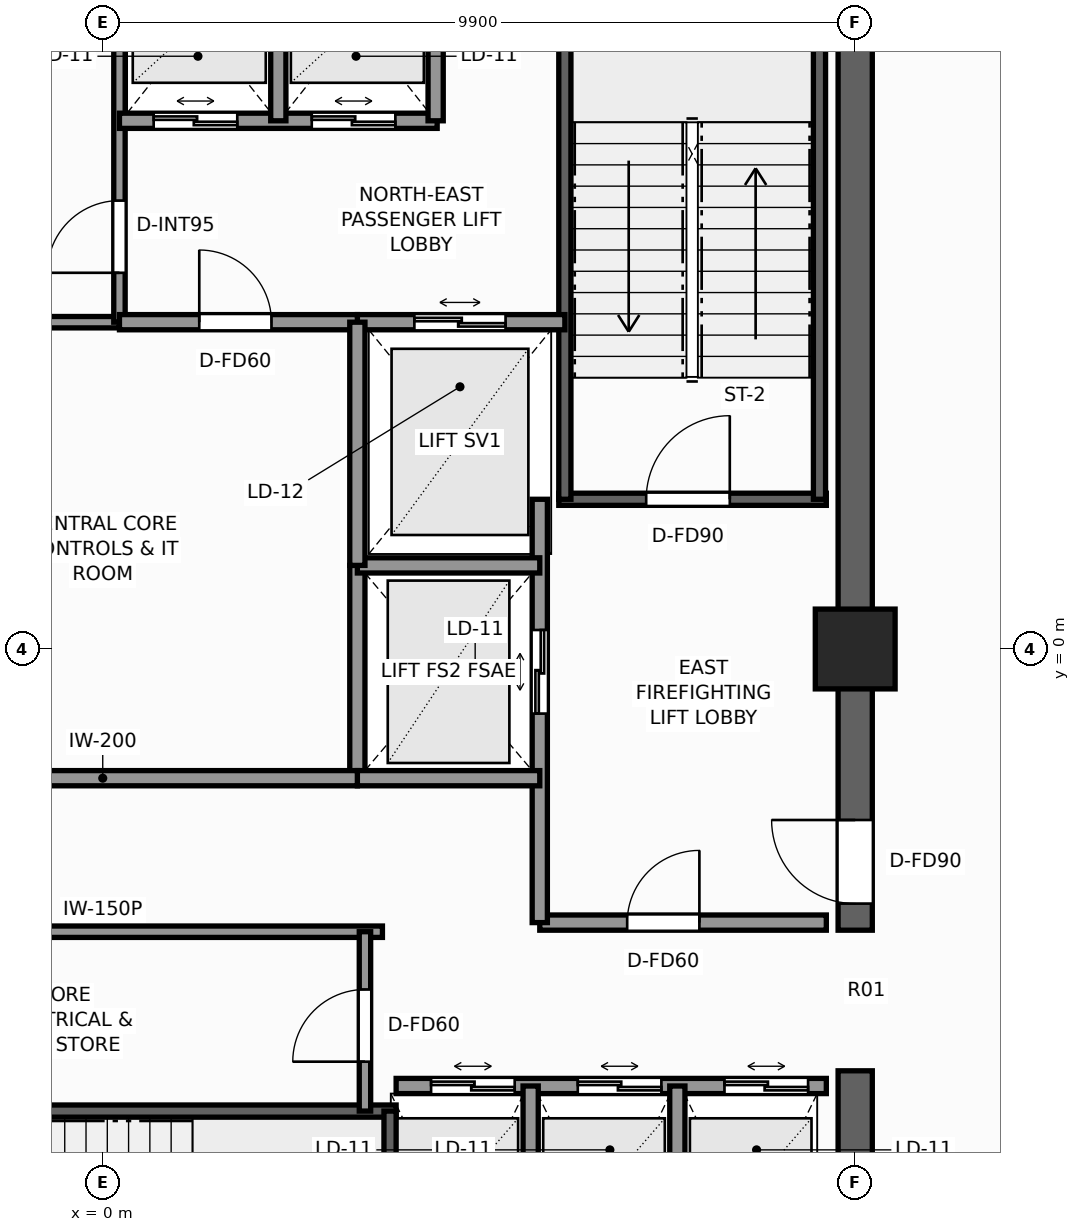
"""IFC4 building model, lengths in metres.
Left out: names, types, materials, properties, quantities, classifications, styles, units other than length and angle.
Written with IfcOpenShell. Run it as: python <this file> out.ifc"""

import sys

from ifc_helpers import new_model, si_unit, direction, frame, frame_2d, origin, origin_2d, place, context, subcontext, project, spatial, rectangle, extrude, element, fill, save


model = new_model("IFC4")
c1 = context("Model", 3, precision=1e-05, world=origin(), true_north=direction((0.0, 1.0)))
c2 = subcontext(c1, "Body", "Model", "MODEL_VIEW")
j1 = project(units=[si_unit("LENGTHUNIT", "METRE"), si_unit("PLANEANGLEUNIT", "RADIAN")], contexts=[c1])
p1 = place(None, origin())
s1 = spatial("IfcSite", under=j1, at=p1, CompositionType="ELEMENT")
p2 = place(p1, origin())
s2 = spatial("IfcBuilding", under=s1, at=p2, CompositionType="ELEMENT")
p3 = place(p2, frame((0.0, 0.0, 262.8)))
s3 = spatial("IfcBuildingStorey", under=s2, at=p3, CompositionType="ELEMENT", Elevation=262.8)
p4 = place(p3, frame((9.9, -9.675, 0.0), z_axis=(0.0, 0.0, 1.0), x_axis=(0.0, 1.0, 0.0)))
e1 = element("IfcWall", 1, at=p4, inside=s3, PredefinedType="SHEAR", context=c2, shape_type="SweptSolid", body=[
    extrude(rectangle(XDim=4.125, YDim=0.45, at=frame_2d((2.062, 0.0))), origin(), (0.0, 0.0, 1.0), 4.6),
])
p5 = place(p3, frame((9.9, -3.7, 0.0), z_axis=(0.0, 0.0, 1.0), x_axis=(0.0, 1.0, 0.0)))
e2 = element("IfcWall", 2, at=p5, inside=s3, PredefinedType="SHEAR", context=c2, shape_type="SweptSolid", body=[
    extrude(rectangle(XDim=13.375, YDim=0.45, at=frame_2d((6.688, 0.0))), origin(), (0.0, 0.0, 1.0), 4.6),
])
p6 = place(p5, frame((0.35, 0.0, 0.0)))
e3 = element("IfcOpeningElement", 3, at=p6, cuts=e2, PredefinedType="OPENING", context=c2, shape_type="SweptSolid", body=[
    extrude(rectangle(XDim=1.1, YDim=2.2, at=frame_2d((0.55, 1.1))), frame((0.0, 0.235, 0.0), z_axis=(0.0, -1.0, 0.0), x_axis=(1.0, 0.0, 0.0)), (0.0, 0.0, 1.0), 0.47),
])
p7 = place(p3, frame((9.9, 0.0, 0.0), z_axis=(0.0, 0.0, 1.0), x_axis=(1.0, 0.0, 0.0)))
e4 = element("IfcColumn", 4, at=p7, inside=s3, PredefinedType="COLUMN", context=c2, shape_type="SweptSolid", body=[
    extrude(rectangle(XDim=1.05, YDim=1.05, at=origin_2d()), origin(), (0.0, 0.0, 1.0), 4.6),
])
p8 = place(p3, frame((6.0, 1.97, 0.0), z_axis=(0.0, 0.0, 1.0), x_axis=(1.0, 0.0, 0.0)))
e5 = element("IfcWall", 5, at=p8, inside=s3, PredefinedType="SHEAR", context=c2, shape_type="SweptSolid", body=[
    extrude(rectangle(XDim=3.52, YDim=0.16, at=frame_2d((1.76, 0.0))), origin(), (0.0, 0.0, 1.0), 4.6),
])
p9 = place(p8, frame((1.15, 0.0, 0.0)))
e6 = element("IfcOpeningElement", 6, at=p9, cuts=e5, PredefinedType="OPENING", context=c2, shape_type="SweptSolid", body=[
    extrude(rectangle(XDim=1.1, YDim=2.2, at=frame_2d((0.55, 1.1))), frame((0.0, 0.09, 0.0), z_axis=(0.0, -1.0, 0.0), x_axis=(1.0, 0.0, 0.0)), (0.0, 0.0, 1.0), 0.18),
])
for number, where, z_axis, x_axis in (
    (7, (6.08, 1.97, 0.0), (0.0, 0.0, 1.0), (0.0, 1.0, 0.0)),
    (8, (9.43, 1.97, 0.0), (0.0, 0.0, 1.0), (0.0, 1.0, 0.0)),
):
    element("IfcWall", number, at=place(p3, frame(where, z_axis=z_axis, x_axis=x_axis)), inside=s3, PredefinedType="SHEAR", context=c2, shape_type="SweptSolid", body=[
        extrude(rectangle(XDim=7.56, YDim=0.16, at=frame_2d((3.78, 0.0))), origin(), (0.0, 0.0, 1.0), 4.6),
    ])
p10 = place(p3, frame((-3.86, -6.08, 0.0), z_axis=(0.0, 0.0, 1.0), x_axis=(1.0, 0.0, 0.0)))
e9 = element("IfcWall", 9, at=p10, inside=s3, PredefinedType="SHEAR", context=c2, shape_type="SweptSolid", body=[
    extrude(rectangle(XDim=7.72, YDim=0.16, at=frame_2d((3.86, 0.0))), origin(), (0.0, 0.0, 1.0), 4.6),
])
p11 = place(p3, frame((3.78, -9.43, 0.0), z_axis=(0.0, 0.0, 1.0), x_axis=(0.0, 1.0, 0.0)))
e10 = element("IfcWall", 10, at=p11, inside=s3, PredefinedType="SHEAR", context=c2, shape_type="SweptSolid", body=[
    extrude(rectangle(XDim=3.35, YDim=0.16, at=frame_2d((1.675, 0.0))), origin(), (0.0, 0.0, 1.0), 4.6),
])
p12 = place(p3, frame((5.75, -3.6, 0.0), z_axis=(0.0, 0.0, 1.0), x_axis=(1.0, 0.0, 0.0)))
e11 = element("IfcWall", 11, at=p12, inside=s3, PredefinedType="SOLIDWALL", context=c2, shape_type="SweptSolid", body=[
    extrude(rectangle(XDim=3.77, YDim=0.2, at=frame_2d((1.885, 0.0))), origin(), (0.0, 0.0, 1.0), 4.32),
])
p13 = place(p12, frame((1.15, 0.0, 0.0)))
e12 = element("IfcOpeningElement", 12, at=p13, cuts=e11, PredefinedType="OPENING", context=c2, shape_type="SweptSolid", body=[
    extrude(rectangle(XDim=0.95, YDim=2.06, at=frame_2d((0.475, 1.03))), frame((0.0, 0.11, 0.0), z_axis=(0.0, -1.0, 0.0), x_axis=(1.0, 0.0, 0.0)), (0.0, 0.0, 1.0), 0.22),
])
p14 = place(p3, frame((5.75, -3.6, 0.0), z_axis=(0.0, 0.0, 1.0), x_axis=(0.0, 1.0, 0.0)))
e13 = element("IfcWall", 13, at=p14, inside=s3, PredefinedType="SOLIDWALL", context=c2, shape_type="SweptSolid", body=[
    extrude(rectangle(XDim=5.57, YDim=0.2, at=frame_2d((2.785, 0.0))), origin(), (0.0, 0.0, 1.0), 4.32),
])
p15 = place(p14, frame((2.75, 0.0, 0.0)))
e14 = element("IfcOpeningElement", 14, at=p15, cuts=e13, PredefinedType="OPENING", context=c2, shape_type="SweptSolid", body=[
    extrude(rectangle(XDim=1.1, YDim=2.2, at=frame_2d((0.55, 1.1))), frame((0.0, 0.11, 0.0), z_axis=(0.0, -1.0, 0.0), x_axis=(1.0, 0.0, 0.0)), (0.0, 0.0, 1.0), 0.22),
])
p16 = place(p3, frame((3.35, -1.7, 0.0), z_axis=(0.0, 0.0, 1.0), x_axis=(0.0, 1.0, 0.0)))
e15 = element("IfcWall", 15, at=p16, inside=s3, PredefinedType="SOLIDWALL", context=c2, shape_type="SweptSolid", body=[
    extrude(rectangle(XDim=2.8, YDim=0.2, at=frame_2d((1.4, 0.0))), origin(), (0.0, 0.0, 1.0), 4.32),
])
for number, where, z_axis, x_axis in (
    (16, (3.35, -1.7, 0.0), (0.0, 0.0, 1.0), (1.0, 0.0, 0.0)),
    (17, (3.35, 1.1, 0.0), (0.0, 0.0, 1.0), (1.0, 0.0, 0.0)),
):
    element("IfcWall", number, at=place(p3, frame(where, z_axis=z_axis, x_axis=x_axis)), inside=s3, PredefinedType="SOLIDWALL", context=c2, shape_type="SweptSolid", body=[
        extrude(rectangle(XDim=2.4, YDim=0.2, at=frame_2d((1.2, 0.0))), origin(), (0.0, 0.0, 1.0), 4.32),
    ])
p17 = place(p3, frame((3.35, 4.3, 0.0), z_axis=(0.0, 0.0, 1.0), x_axis=(1.0, 0.0, 0.0)))
e18 = element("IfcWall", 18, at=p17, inside=s3, PredefinedType="SOLIDWALL", context=c2, shape_type="SweptSolid", body=[
    extrude(rectangle(XDim=2.73, YDim=0.2, at=frame_2d((1.365, 0.0))), origin(), (0.0, 0.0, 1.0), 4.32),
])
p18 = place(p17, frame((0.75, 0.0, 0.0)))
e19 = element("IfcOpeningElement", 19, at=p18, cuts=e18, PredefinedType="OPENING", context=c2, shape_type="SweptSolid", body=[
    extrude(rectangle(XDim=1.2, YDim=2.25, at=frame_2d((0.6, 1.125))), frame((0.0, 0.11, 0.0), z_axis=(0.0, -1.0, 0.0), x_axis=(1.0, 0.0, 0.0)), (0.0, 0.0, 1.0), 0.22),
])
p19 = place(p3, frame((-6.08, 4.3, 0.0), z_axis=(0.0, 0.0, 1.0), x_axis=(1.0, 0.0, 0.0)))
e20 = element("IfcWall", 20, at=p19, inside=s3, PredefinedType="PARTITIONING", context=c2, shape_type="SweptSolid", body=[
    extrude(rectangle(XDim=6.3, YDim=0.15, at=frame_2d((3.15, 0.0))), origin(), (0.0, 0.0, 1.0), 4.32),
])
p20 = place(p19, frame((1.05, 0.0, 0.0)))
e21 = element("IfcOpeningElement", 21, at=p20, cuts=e20, PredefinedType="OPENING", context=c2, shape_type="SweptSolid", body=[
    extrude(rectangle(XDim=0.85, YDim=2.03, at=frame_2d((0.425, 1.015))), frame((0.0, 0.085, 0.0), z_axis=(0.0, -1.0, 0.0), x_axis=(1.0, 0.0, 0.0)), (0.0, 0.0, 1.0), 0.17),
])
p21 = place(p3, frame((0.22, 4.3, 0.0), z_axis=(0.0, 0.0, 1.0), x_axis=(0.0, 1.0, 0.0)))
e22 = element("IfcWall", 22, at=p21, inside=s3, PredefinedType="PARTITIONING", context=c2, shape_type="SweptSolid", body=[
    extrude(rectangle(XDim=5.22, YDim=0.15, at=frame_2d((2.61, 0.0))), origin(), (0.0, 0.0, 1.0), 4.32),
])
p22 = place(p21, frame((0.65, 0.0, 0.0)))
e23 = element("IfcOpeningElement", 23, at=p22, cuts=e22, PredefinedType="OPENING", context=c2, shape_type="SweptSolid", body=[
    extrude(rectangle(XDim=0.95, YDim=2.06, at=frame_2d((0.475, 1.03))), frame((0.0, 0.085, 0.0), z_axis=(0.0, -1.0, 0.0), x_axis=(1.0, 0.0, 0.0)), (0.0, 0.0, 1.0), 0.17),
])
p23 = place(p3, frame((0.22, 6.95, 0.0), z_axis=(0.0, 0.0, 1.0), x_axis=(1.0, 0.0, 0.0)))
e24 = element("IfcWall", 24, at=p23, inside=s3, PredefinedType="SOLIDWALL", context=c2, shape_type="SweptSolid", body=[
    extrude(rectangle(XDim=4.18, YDim=0.2, at=frame_2d((2.09, 0.0))), origin(), (0.0, 0.0, 1.0), 4.32),
])
p24 = place(p23, frame((0.45, 0.0, 0.0)))
e25 = element("IfcOpeningElement", 25, at=p24, cuts=e24, PredefinedType="OPENING", context=c2, shape_type="SweptSolid", body=[
    extrude(rectangle(XDim=1.1, YDim=2.2, at=frame_2d((0.55, 1.1))), frame((0.0, 0.11, 0.0), z_axis=(0.0, -1.0, 0.0), x_axis=(1.0, 0.0, 0.0)), (0.0, 0.0, 1.0), 0.22),
])
p25 = place(p23, frame((2.53, 0.0, 0.0)))
e26 = element("IfcOpeningElement", 26, at=p25, cuts=e24, PredefinedType="OPENING", context=c2, shape_type="SweptSolid", body=[
    extrude(rectangle(XDim=1.1, YDim=2.2, at=frame_2d((0.55, 1.1))), frame((0.0, 0.11, 0.0), z_axis=(0.0, -1.0, 0.0), x_axis=(1.0, 0.0, 0.0)), (0.0, 0.0, 1.0), 0.22),
])
for number, where, z_axis, x_axis in (
    (27, (4.38, 6.95, 0.0), (0.0, 0.0, 1.0), (0.0, 1.0, 0.0)),
    (28, (2.31, 6.95, 0.0), (0.0, 0.0, 1.0), (0.0, 1.0, 0.0)),
):
    element("IfcWall", number, at=place(p3, frame(where, z_axis=z_axis, x_axis=x_axis)), inside=s3, PredefinedType="SOLIDWALL", context=c2, shape_type="SweptSolid", body=[
        extrude(rectangle(XDim=2.57, YDim=0.2, at=frame_2d((1.285, 0.0))), origin(), (0.0, 0.0, 1.0), 4.32),
    ])
p26 = place(p3, frame((3.86, -5.75, 0.0), z_axis=(0.0, 0.0, 1.0), x_axis=(1.0, 0.0, 0.0)))
e29 = element("IfcWall", 29, at=p26, inside=s3, PredefinedType="SOLIDWALL", context=c2, shape_type="SweptSolid", body=[
    extrude(rectangle(XDim=5.66, YDim=0.2, at=frame_2d((2.83, 0.0))), origin(), (0.0, 0.0, 1.0), 4.32),
])
p27 = place(p26, frame((0.46, 0.0, 0.0)))
e30 = element("IfcOpeningElement", 30, at=p27, cuts=e29, PredefinedType="OPENING", context=c2, shape_type="SweptSolid", body=[
    extrude(rectangle(XDim=1.1, YDim=2.2, at=frame_2d((0.55, 1.1))), frame((0.0, 0.11, 0.0), z_axis=(0.0, -1.0, 0.0), x_axis=(1.0, 0.0, 0.0)), (0.0, 0.0, 1.0), 0.22),
])
p28 = place(p26, frame((2.39, 0.0, 0.0)))
e31 = element("IfcOpeningElement", 31, at=p28, cuts=e29, PredefinedType="OPENING", context=c2, shape_type="SweptSolid", body=[
    extrude(rectangle(XDim=1.1, YDim=2.2, at=frame_2d((0.55, 1.1))), frame((0.0, 0.11, 0.0), z_axis=(0.0, -1.0, 0.0), x_axis=(1.0, 0.0, 0.0)), (0.0, 0.0, 1.0), 0.22),
])
p29 = place(p26, frame((4.32, 0.0, 0.0)))
e32 = element("IfcOpeningElement", 32, at=p29, cuts=e29, PredefinedType="OPENING", context=c2, shape_type="SweptSolid", body=[
    extrude(rectangle(XDim=1.1, YDim=2.2, at=frame_2d((0.55, 1.1))), frame((0.0, 0.11, 0.0), z_axis=(0.0, -1.0, 0.0), x_axis=(1.0, 0.0, 0.0)), (0.0, 0.0, 1.0), 0.22),
])
for number, where, z_axis, x_axis in (
    (33, (5.63, -9.52, 0.0), (0.0, 0.0, 1.0), (0.0, 1.0, 0.0)),
    (34, (7.56, -9.52, 0.0), (0.0, 0.0, 1.0), (0.0, 1.0, 0.0)),
):
    element("IfcWall", number, at=place(p3, frame(where, z_axis=z_axis, x_axis=x_axis)), inside=s3, PredefinedType="SOLIDWALL", context=c2, shape_type="SweptSolid", body=[
        extrude(rectangle(XDim=3.77, YDim=0.2, at=frame_2d((1.885, 0.0))), origin(), (0.0, 0.0, 1.0), 4.32),
    ])
p30 = place(p3, frame((0.22, 4.3, 0.0), z_axis=(0.0, 0.0, 1.0), x_axis=(1.0, 0.0, 0.0)))
e35 = element("IfcWall", 35, at=p30, inside=s3, PredefinedType="SOLIDWALL", context=c2, shape_type="SweptSolid", body=[
    extrude(rectangle(XDim=3.13, YDim=0.2, at=frame_2d((1.565, 0.0))), origin(), (0.0, 0.0, 1.0), 4.32),
])
p31 = place(p30, frame((1.05, 0.0, 0.0)))
e36 = element("IfcOpeningElement", 36, at=p31, cuts=e35, PredefinedType="OPENING", context=c2, shape_type="SweptSolid", body=[
    extrude(rectangle(XDim=0.95, YDim=2.06, at=frame_2d((0.475, 1.03))), frame((0.0, 0.11, 0.0), z_axis=(0.0, -1.0, 0.0), x_axis=(1.0, 0.0, 0.0)), (0.0, 0.0, 1.0), 0.22),
])
p32 = place(p3, frame((-3.35, -1.7, 0.0), z_axis=(0.0, 0.0, 1.0), x_axis=(1.0, 0.0, 0.0)))
e37 = element("IfcWall", 37, at=p32, inside=s3, PredefinedType="SOLIDWALL", context=c2, shape_type="SweptSolid", body=[
    extrude(rectangle(XDim=6.7, YDim=0.2, at=frame_2d((3.35, 0.0))), origin(), (0.0, 0.0, 1.0), 4.32),
])
p33 = place(p3, frame((3.35, 1.1, 0.0), z_axis=(0.0, 0.0, 1.0), x_axis=(0.0, 1.0, 0.0)))
e38 = element("IfcWall", 38, at=p33, inside=s3, PredefinedType="SOLIDWALL", context=c2, shape_type="SweptSolid", body=[
    extrude(rectangle(XDim=3.2, YDim=0.2, at=frame_2d((1.6, 0.0))), origin(), (0.0, 0.0, 1.0), 4.32),
])
p34 = place(p3, frame((-3.68, -3.72, 0.0), z_axis=(0.0, 0.0, 1.0), x_axis=(1.0, 0.0, 0.0)))
e39 = element("IfcWall", 39, at=p34, inside=s3, PredefinedType="PARTITIONING", context=c2, shape_type="SweptSolid", body=[
    extrude(rectangle(XDim=7.36, YDim=0.15, at=frame_2d((3.68, 0.0))), origin(), (0.0, 0.0, 1.0), 4.32),
])
p35 = place(p3, frame((3.45, -6.08, 0.0), z_axis=(0.0, 0.0, 1.0), x_axis=(0.0, 1.0, 0.0)))
e40 = element("IfcWall", 40, at=p35, inside=s3, PredefinedType="PARTITIONING", context=c2, shape_type="SweptSolid", body=[
    extrude(rectangle(XDim=2.36, YDim=0.15, at=frame_2d((1.18, 0.0))), origin(), (0.0, 0.0, 1.0), 4.32),
])
p36 = place(p35, frame((0.65, 0.0, 0.0)))
e41 = element("IfcOpeningElement", 41, at=p36, cuts=e40, PredefinedType="OPENING", context=c2, shape_type="SweptSolid", body=[
    extrude(rectangle(XDim=0.95, YDim=2.06, at=frame_2d((0.475, 1.03))), frame((0.0, 0.085, 0.0), z_axis=(0.0, -1.0, 0.0), x_axis=(1.0, 0.0, 0.0)), (0.0, 0.0, 1.0), 0.17),
])
p37 = place(p9, origin())
e42 = element("IfcDoor", 42, at=p37, inside=s3, OperationType="SINGLE_SWING_RIGHT", PredefinedType="DOOR", context=c2, shape_type="SweptSolid", body=[
    extrude(rectangle(XDim=1.1, YDim=2.2, at=frame_2d((0.55, 1.1))), frame((0.0, 0.025, 0.0), z_axis=(0.0, -1.0, 0.0), x_axis=(1.0, 0.0, 0.0)), (0.0, 0.0, 1.0), 0.05),
])
fill(e6, e42)
p38 = place(p6, origin())
e43 = element("IfcDoor", 43, at=p38, inside=s3, OperationType="SINGLE_SWING_RIGHT", PredefinedType="DOOR", context=c2, shape_type="SweptSolid", body=[
    extrude(rectangle(XDim=1.1, YDim=2.2, at=frame_2d((0.55, 1.1))), frame((0.0, 0.025, 0.0), z_axis=(0.0, -1.0, 0.0), x_axis=(1.0, 0.0, 0.0)), (0.0, 0.0, 1.0), 0.05),
])
fill(e3, e43)
p39 = place(p15, origin())
e44 = element("IfcDoor", 44, at=p39, inside=s3, OperationType="DOUBLE_DOOR_SLIDING", PredefinedType="DOOR", context=c2, shape_type="SweptSolid", body=[
    extrude(rectangle(XDim=1.1, YDim=2.2, at=frame_2d((0.55, 1.1))), frame((0.0, 0.025, 0.0), z_axis=(0.0, -1.0, 0.0), x_axis=(1.0, 0.0, 0.0)), (0.0, 0.0, 1.0), 0.05),
])
fill(e14, e44)
p40 = place(p18, origin())
e45 = element("IfcDoor", 45, at=p40, inside=s3, OperationType="DOUBLE_DOOR_SLIDING", PredefinedType="DOOR", context=c2, shape_type="SweptSolid", body=[
    extrude(rectangle(XDim=1.2, YDim=2.25, at=frame_2d((0.6, 1.125))), frame((0.0, 0.025, 0.0), z_axis=(0.0, -1.0, 0.0), x_axis=(1.0, 0.0, 0.0)), (0.0, 0.0, 1.0), 0.05),
])
fill(e19, e45)
p41 = place(p22, origin())
e46 = element("IfcDoor", 46, at=p41, inside=s3, OperationType="SINGLE_SWING_LEFT", PredefinedType="DOOR", context=c2, shape_type="SweptSolid", body=[
    extrude(rectangle(XDim=0.95, YDim=2.06, at=frame_2d((0.475, 1.03))), frame((0.0, 0.025, 0.0), z_axis=(0.0, -1.0, 0.0), x_axis=(1.0, 0.0, 0.0)), (0.0, 0.0, 1.0), 0.05),
])
fill(e23, e46)
p42 = place(p24, origin())
e47 = element("IfcDoor", 47, at=p42, inside=s3, OperationType="DOUBLE_DOOR_SLIDING", PredefinedType="DOOR", context=c2, shape_type="SweptSolid", body=[
    extrude(rectangle(XDim=1.1, YDim=2.2, at=frame_2d((0.55, 1.1))), frame((0.0, 0.025, 0.0), z_axis=(0.0, -1.0, 0.0), x_axis=(1.0, 0.0, 0.0)), (0.0, 0.0, 1.0), 0.05),
])
fill(e25, e47)
p43 = place(p25, origin())
e48 = element("IfcDoor", 48, at=p43, inside=s3, OperationType="DOUBLE_DOOR_SLIDING", PredefinedType="DOOR", context=c2, shape_type="SweptSolid", body=[
    extrude(rectangle(XDim=1.1, YDim=2.2, at=frame_2d((0.55, 1.1))), frame((0.0, 0.025, 0.0), z_axis=(0.0, -1.0, 0.0), x_axis=(1.0, 0.0, 0.0)), (0.0, 0.0, 1.0), 0.05),
])
fill(e26, e48)
p44 = place(p27, origin())
e49 = element("IfcDoor", 49, at=p44, inside=s3, OperationType="DOUBLE_DOOR_SLIDING", PredefinedType="DOOR", context=c2, shape_type="SweptSolid", body=[
    extrude(rectangle(XDim=1.1, YDim=2.2, at=frame_2d((0.55, 1.1))), frame((0.0, 0.025, 0.0), z_axis=(0.0, -1.0, 0.0), x_axis=(1.0, 0.0, 0.0)), (0.0, 0.0, 1.0), 0.05),
])
fill(e30, e49)
p45 = place(p28, origin())
e50 = element("IfcDoor", 50, at=p45, inside=s3, OperationType="DOUBLE_DOOR_SLIDING", PredefinedType="DOOR", context=c2, shape_type="SweptSolid", body=[
    extrude(rectangle(XDim=1.1, YDim=2.2, at=frame_2d((0.55, 1.1))), frame((0.0, 0.025, 0.0), z_axis=(0.0, -1.0, 0.0), x_axis=(1.0, 0.0, 0.0)), (0.0, 0.0, 1.0), 0.05),
])
fill(e31, e50)
p46 = place(p29, origin())
e51 = element("IfcDoor", 51, at=p46, inside=s3, OperationType="DOUBLE_DOOR_SLIDING", PredefinedType="DOOR", context=c2, shape_type="SweptSolid", body=[
    extrude(rectangle(XDim=1.1, YDim=2.2, at=frame_2d((0.55, 1.1))), frame((0.0, 0.025, 0.0), z_axis=(0.0, -1.0, 0.0), x_axis=(1.0, 0.0, 0.0)), (0.0, 0.0, 1.0), 0.05),
])
fill(e32, e51)
p47 = place(p13, origin())
e52 = element("IfcDoor", 52, at=p47, inside=s3, OperationType="SINGLE_SWING_RIGHT", PredefinedType="DOOR", context=c2, shape_type="SweptSolid", body=[
    extrude(rectangle(XDim=0.95, YDim=2.06, at=frame_2d((0.475, 1.03))), frame((0.0, 0.025, 0.0), z_axis=(0.0, -1.0, 0.0), x_axis=(1.0, 0.0, 0.0)), (0.0, 0.0, 1.0), 0.05),
])
fill(e12, e52)
p48 = place(p31, origin())
e53 = element("IfcDoor", 53, at=p48, inside=s3, OperationType="SINGLE_SWING_LEFT", PredefinedType="DOOR", context=c2, shape_type="SweptSolid", body=[
    extrude(rectangle(XDim=0.95, YDim=2.06, at=frame_2d((0.475, 1.03))), frame((0.0, 0.025, 0.0), z_axis=(0.0, -1.0, 0.0), x_axis=(1.0, 0.0, 0.0)), (0.0, 0.0, 1.0), 0.05),
])
fill(e36, e53)
p49 = place(p36, origin())
e54 = element("IfcDoor", 54, at=p49, inside=s3, OperationType="SINGLE_SWING_LEFT", PredefinedType="DOOR", context=c2, shape_type="SweptSolid", body=[
    extrude(rectangle(XDim=0.95, YDim=2.06, at=frame_2d((0.475, 1.03))), frame((0.0, 0.025, 0.0), z_axis=(0.0, -1.0, 0.0), x_axis=(1.0, 0.0, 0.0)), (0.0, 0.0, 1.0), 0.05),
])
fill(e41, e54)
save(model, sys.argv[1])
